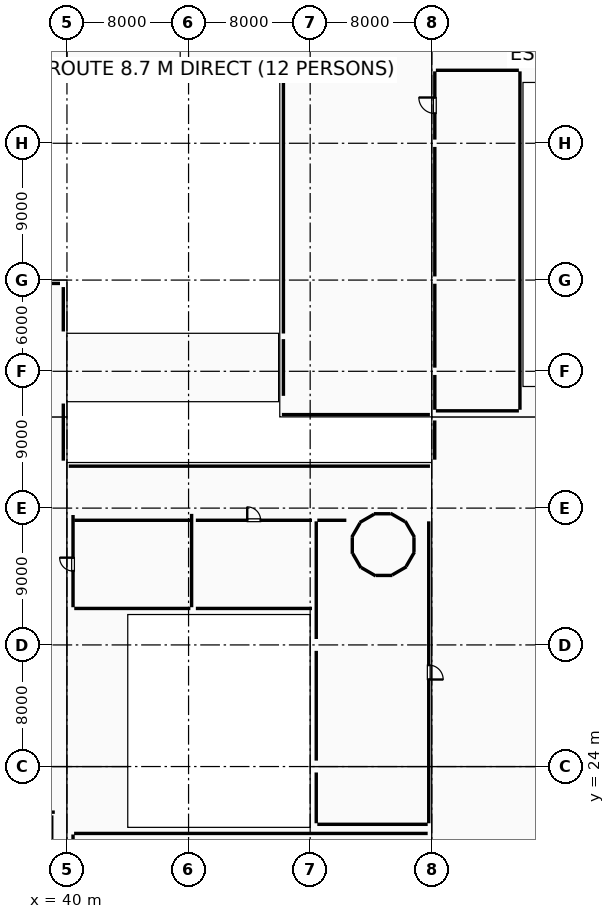
"""IFC4 building model, lengths in metres.
Left out: names, types, materials, properties, quantities, classifications, styles, units other than length and angle.
Written with IfcOpenShell. Run it as: python <this file> out.ifc"""

import sys

from ifc_helpers import new_model, si_unit, direction, frame, frame_2d, origin, origin_2d, place, context, subcontext, project, spatial, rectangle, hollow_rectangle, i_section, extrude, element, fill, save


model = new_model("IFC4")
c1 = context("Model", 3, precision=1e-05, world=origin(), true_north=direction((0.0, 1.0)))
c2 = subcontext(c1, "Body", "Model", "MODEL_VIEW")
j1 = project(units=[si_unit("LENGTHUNIT", "METRE"), si_unit("PLANEANGLEUNIT", "RADIAN")], contexts=[c1])
p1 = place(None, origin())
s1 = spatial("IfcSite", under=j1, at=p1, CompositionType="ELEMENT")
p2 = place(p1, origin())
s2 = spatial("IfcBuilding", under=s1, at=p2, CompositionType="ELEMENT")
p3 = place(p2, frame((0.0, 0.0, 10.2)))
s3 = spatial("IfcBuildingStorey", under=s2, at=p3, CompositionType="ELEMENT", Elevation=10.2)
for number, where, z_axis, x_axis in (
    (1, (40.0, 24.0, 0.0), (0.0, 0.0, 1.0), (1.0, 0.0, 0.0)),
    (2, (40.0, 32.0, 0.0), (0.0, 0.0, 1.0), (1.0, 0.0, 0.0)),
    (3, (40.0, 41.0, 0.0), (0.0, 0.0, 1.0), (1.0, 0.0, 0.0)),
    (4, (40.0, 50.0, 0.0), (0.0, 0.0, 1.0), (1.0, 0.0, 0.0)),
    (5, (40.0, 56.0, 0.0), (0.0, 0.0, 1.0), (1.0, 0.0, 0.0)),
    (6, (40.0, 65.0, 0.0), (0.0, 0.0, 1.0), (1.0, 0.0, 0.0)),
):
    element("IfcColumn", number, at=place(p3, frame(where, z_axis=z_axis, x_axis=x_axis)), inside=s3, PredefinedType="COLUMN", context=c2, shape_type="SweptSolid", body=[
        extrude(rectangle(XDim=0.9, YDim=0.9, at=origin_2d()), origin(), (0.0, 0.0, 1.0), 4.8),
    ])
p4 = place(p3, frame((48.0, 41.0, 0.0), z_axis=(0.0, 0.0, 1.0), x_axis=(1.0, 0.0, 0.0)))
e7 = element("IfcColumn", 7, at=p4, inside=s3, PredefinedType="COLUMN", context=c2, shape_type="SweptSolid", body=[
    extrude(rectangle(XDim=0.75, YDim=0.75, at=origin_2d()), origin(), (0.0, 0.0, 1.0), 4.8),
])
p5 = place(p3, frame((48.0, 65.0, 0.0), z_axis=(0.0, 0.0, 1.0), x_axis=(1.0, 0.0, 0.0)))
e8 = element("IfcColumn", 8, at=p5, inside=s3, PredefinedType="COLUMN", context=c2, shape_type="SweptSolid", body=[
    extrude(rectangle(XDim=0.65, YDim=0.65, at=origin_2d()), origin(), (0.0, 0.0, 1.0), 4.8),
])
for number, where, z_axis, x_axis in (
    (9, (56.0, 24.0, 0.0), (0.0, 0.0, 1.0), (1.0, 0.0, 0.0)),
    (10, (56.0, 32.0, 0.0), (0.0, 0.0, 1.0), (1.0, 0.0, 0.0)),
    (11, (56.0, 41.0, 0.0), (0.0, 0.0, 1.0), (1.0, 0.0, 0.0)),
):
    element("IfcColumn", number, at=place(p3, frame(where, z_axis=z_axis, x_axis=x_axis)), inside=s3, PredefinedType="COLUMN", context=c2, shape_type="SweptSolid", body=[
        extrude(rectangle(XDim=0.75, YDim=0.75, at=origin_2d()), origin(), (0.0, 0.0, 1.0), 4.8),
    ])
for number, where, z_axis, x_axis in (
    (12, (56.0, 50.0, 0.0), (0.0, 0.0, 1.0), (1.0, 0.0, 0.0)),
    (13, (56.0, 56.0, 0.0), (0.0, 0.0, 1.0), (1.0, 0.0, 0.0)),
    (14, (56.0, 65.0, 0.0), (0.0, 0.0, 1.0), (1.0, 0.0, 0.0)),
):
    element("IfcColumn", number, at=place(p3, frame(where, z_axis=z_axis, x_axis=x_axis)), inside=s3, PredefinedType="COLUMN", context=c2, shape_type="SweptSolid", body=[
        extrude(rectangle(XDim=0.9, YDim=0.9, at=origin_2d()), origin(), (0.0, 0.0, 1.0), 4.8),
    ])
p6 = place(p3, frame((64.0, 50.0, 0.0), z_axis=(0.0, 0.0, 1.0), x_axis=(1.0, 0.0, 0.0)))
e15 = element("IfcColumn", 15, at=p6, inside=s3, PredefinedType="COLUMN", context=c2, shape_type="SweptSolid", body=[
    extrude(hollow_rectangle(XDim=0.45, YDim=0.45, WallThickness=0.02, at=origin_2d()), origin(), (0.0, 0.0, 1.0), 4.8),
])
for number, where, z_axis, x_axis in (
    (16, (64.0, 56.0, 0.0), (0.0, 0.0, 1.0), (1.0, 0.0, 0.0)),
    (17, (64.0, 65.0, 0.0), (0.0, 0.0, 1.0), (1.0, 0.0, 0.0)),
):
    element("IfcColumn", number, at=place(p3, frame(where, z_axis=z_axis, x_axis=x_axis)), inside=s3, PredefinedType="COLUMN", context=c2, shape_type="SweptSolid", body=[
        extrude(i_section(OverallWidth=0.25, OverallDepth=0.45, WebThickness=0.011, FlangeThickness=0.014, FilletRadius=0.015, at=origin_2d()), origin(), (0.0, 0.0, 1.0), 4.8),
    ])
for number, where, z_axis, x_axis in (
    (18, (40.0, 48.2, 0.0), (0.0, 0.0, 1.0), (1.0, 0.0, 0.0)),
    (19, (54.0, 48.2, 0.0), (0.0, 0.0, 1.0), (1.0, 0.0, 0.0)),
    (20, (40.0, 52.3, 0.0), (0.0, 0.0, 1.0), (1.0, 0.0, 0.0)),
    (21, (54.0, 52.3, 0.0), (0.0, 0.0, 1.0), (1.0, 0.0, 0.0)),
):
    element("IfcColumn", number, at=place(p3, frame(where, z_axis=z_axis, x_axis=x_axis)), inside=s3, PredefinedType="COLUMN", context=c2, shape_type="SweptSolid", body=[
        extrude(i_section(OverallWidth=0.25, OverallDepth=0.35, WebThickness=0.01, FlangeThickness=0.012, FilletRadius=0.012, at=origin_2d()), origin(), (0.0, 0.0, 1.0), 4.8),
    ])
p7 = place(p3, frame((64.0, 47.0, 0.0), z_axis=(0.0, 0.0, 1.0), x_axis=(1.0, 0.0, 0.0)))
e22 = element("IfcColumn", 22, at=p7, inside=s3, PredefinedType="COLUMN", context=c2, shape_type="SweptSolid", body=[
    extrude(i_section(OverallWidth=0.25, OverallDepth=0.45, WebThickness=0.011, FlangeThickness=0.014, FilletRadius=0.015, at=origin_2d()), origin(), (0.0, 0.0, 1.0), 4.8),
])
p8 = place(p3, frame((70.0, 41.0, 0.0), z_axis=(0.0, 0.0, 1.0), x_axis=(1.0, 0.0, 0.0)))
e23 = element("IfcColumn", 23, at=p8, inside=s3, PredefinedType="COLUMN", context=c2, shape_type="SweptSolid", body=[
    extrude(rectangle(XDim=1.2, YDim=1.2, at=origin_2d()), origin(), (0.0, 0.0, 1.0), 4.8),
])
p9 = place(p3, frame((39.76, 47.88, 0.0), z_axis=(0.0, 0.0, 1.0), x_axis=(0.0, -1.0, 0.0)))
e24 = element("IfcWall", 24, at=p9, inside=s3, PredefinedType="PARAPET", context=c2, shape_type="SweptSolid", body=[
    extrude(rectangle(XDim=3.76, YDim=0.18, at=frame_2d((1.88, 0.0))), origin(), (0.0, 0.0, 1.0), 0.88),
])
p10 = place(p3, frame((40.12, 43.76, 0.0), z_axis=(0.0, 0.0, 1.0), x_axis=(1.0, 0.0, 0.0)))
e25 = element("IfcWall", 25, at=p10, inside=s3, PredefinedType="PARAPET", context=c2, shape_type="SweptSolid", body=[
    extrude(rectangle(XDim=23.76, YDim=0.18, at=frame_2d((11.88, 0.0))), origin(), (0.0, 0.0, 1.0), 0.88),
])
p11 = place(p3, frame((64.195, 44.185, 0.0), z_axis=(0.0, 0.0, 1.0), x_axis=(0.0, 1.0, 0.0)))
e26 = element("IfcWall", 26, at=p11, inside=s3, PredefinedType="STANDARD", context=c2, shape_type="SweptSolid", body=[
    extrude(rectangle(XDim=2.582, YDim=0.35, at=frame_2d((1.291, 0.0))), origin(), (0.0, 0.0, 1.0), 3.725),
])
p12 = place(p3, frame((63.876, 47.15, 0.0), z_axis=(0.0, 0.0, 1.0), x_axis=(-1.0, 0.0, 0.0)))
e27 = element("IfcWall", 27, at=p12, inside=s3, PredefinedType="ELEMENTEDWALL", context=c2, shape_type="SweptSolid", body=[
    extrude(rectangle(XDim=9.736, YDim=0.26, at=frame_2d((4.868, 0.0))), origin(), (0.0, 0.0, 1.0), 4.54),
])
p13 = place(p12, frame((4.076, 0.0, 0.95)))
e28 = element("IfcOpeningElement", 28, at=p13, cuts=e27, PredefinedType="OPENING", context=c2, shape_type="SweptSolid", body=[
    extrude(rectangle(XDim=1.6, YDim=2.1, at=frame_2d((0.8, 1.05))), frame((0.0, 0.14, 0.0), z_axis=(0.0, -1.0, 0.0), x_axis=(1.0, 0.0, 0.0)), (0.0, 0.0, 1.0), 0.28),
])
p14 = place(p3, frame((54.24, 48.385, 0.0), z_axis=(0.0, 0.0, 1.0), x_axis=(0.0, 1.0, 0.0)))
e29 = element("IfcWall", 29, at=p14, inside=s3, PredefinedType="PARAPET", context=c2, shape_type="SweptSolid", body=[
    extrude(rectangle(XDim=3.73, YDim=0.18, at=frame_2d((1.865, 0.0))), origin(), (0.0, 0.0, 1.0), 0.88),
])
p15 = place(p3, frame((54.24, 52.485, 0.0), z_axis=(0.0, 0.0, 1.0), x_axis=(0.0, 1.0, 0.0)))
e30 = element("IfcWall", 30, at=p15, inside=s3, PredefinedType="PARAPET", context=c2, shape_type="SweptSolid", body=[
    extrude(rectangle(XDim=17.395, YDim=0.18, at=frame_2d((8.697, 0.0))), origin(), (0.0, 0.0, 1.0), 0.88),
])
p16 = place(p3, frame((53.87, 70.14, 0.0), z_axis=(0.0, 0.0, 1.0), x_axis=(-1.0, 0.0, 0.0)))
e31 = element("IfcWall", 31, at=p16, inside=s3, PredefinedType="ELEMENTEDWALL", context=c2, shape_type="SweptSolid", body=[
    extrude(rectangle(XDim=29.74, YDim=0.24, at=frame_2d((14.87, 0.0))), origin(), (0.0, 0.0, 1.0), 4.54),
])
p17 = place(p16, frame((13.97, 0.0, 0.95)))
e32 = element("IfcOpeningElement", 32, at=p17, cuts=e31, PredefinedType="OPENING", context=c2, shape_type="SweptSolid", body=[
    extrude(rectangle(XDim=1.8, YDim=1.2, at=frame_2d((0.9, 0.6))), frame((0.0, 0.13, 0.0), z_axis=(0.0, -1.0, 0.0), x_axis=(1.0, 0.0, 0.0)), (0.0, 0.0, 1.0), 0.26),
])
p18 = place(p3, frame((32.383, 55.78, 0.0), z_axis=(0.0, 0.0, 1.0), x_axis=(1.0, 0.0, 0.0)))
e33 = element("IfcWall", 33, at=p18, inside=s3, PredefinedType="STANDARD", context=c2, shape_type="SweptSolid", body=[
    extrude(rectangle(XDim=7.159, YDim=0.4, at=frame_2d((3.58, 0.0))), origin(), (0.0, 0.0, 1.0), 3.975),
])
p19 = place(p18, frame((3.029, 0.0, 0.95)))
e34 = element("IfcOpeningElement", 34, at=p19, cuts=e33, PredefinedType="OPENING", context=c2, shape_type="SweptSolid", body=[
    extrude(rectangle(XDim=1.1, YDim=1.5, at=frame_2d((0.55, 0.75))), frame((0.0, 0.21, 0.0), z_axis=(0.0, -1.0, 0.0), x_axis=(1.0, 0.0, 0.0)), (0.0, 0.0, 1.0), 0.42),
])
p20 = place(p3, frame((39.76, 55.54, 0.0), z_axis=(0.0, 0.0, 1.0), x_axis=(0.0, -1.0, 0.0)))
e35 = element("IfcWall", 35, at=p20, inside=s3, PredefinedType="PARAPET", context=c2, shape_type="SweptSolid", body=[
    extrude(rectangle(XDim=2.92, YDim=0.18, at=frame_2d((1.46, 0.0))), origin(), (0.0, 0.0, 1.0), 0.88),
])
p21 = place(p3, frame((39.2, 21.0, 0.0), z_axis=(0.0, 0.0, 1.0), x_axis=(-1.0, 0.0, 0.0)))
e36 = element("IfcWall", 36, at=p21, inside=s3, PredefinedType="SHEAR", context=c2, shape_type="SweptSolid", body=[
    extrude(rectangle(XDim=8.946, YDim=0.4, at=frame_2d((4.473, 0.0))), origin(), (0.0, 0.0, 1.0), 4.54),
])
p22 = place(p3, frame((39.0, 12.41, 0.0), z_axis=(0.0, 0.0, 1.0), x_axis=(0.0, 1.0, 0.0)))
e37 = element("IfcWall", 37, at=p22, inside=s3, PredefinedType="SHEAR", context=c2, shape_type="SweptSolid", body=[
    extrude(rectangle(XDim=8.38, YDim=0.4, at=frame_2d((4.19, 0.0))), origin(), (0.0, 0.0, 1.0), 4.54),
])
p23 = place(p3, frame((62.861, 39.086, 0.0), z_axis=(0.0, 0.0, 1.0), x_axis=(-0.499930512259, 0.866065518833, 0.0)))
e38 = element("IfcWall", 38, at=p23, inside=s3, PredefinedType="SHEAR", context=c2, shape_type="SweptSolid", body=[
    extrude(rectangle(XDim=1.219, YDim=0.35, at=frame_2d((0.609, 0.0))), origin(), (0.0, 0.0, 1.0), 4.54),
])
for number, where, z_axis, x_axis in (
    (39, (62.233, 40.115, 0.0), (0.0, 0.0, 1.0), (-0.866, 0.5, 0.0)),
    (40, (61.283, 40.628, 0.0), (0.0, 0.0, 1.0), (-1.0, 0.0, 0.0)),
    (41, (60.205, 40.598, 0.0), (0.0, 0.0, 1.0), (-0.866, -0.5, 0.0)),
    (42, (59.285, 40.033, 0.0), (0.0, 0.0, 1.0), (-0.5, -0.866, 0.0)),
    (43, (58.771, 39.083, 0.0), (0.0, 0.0, 1.0), (0.0, -1.0, 0.0)),
    (44, (58.802, 38.004, 0.0), (0.0, 0.0, 1.0), (0.5, -0.866, 0.0)),
):
    element("IfcWall", number, at=place(p3, frame(where, z_axis=z_axis, x_axis=x_axis)), inside=s3, PredefinedType="SHEAR", context=c2, shape_type="SweptSolid", body=[
        extrude(rectangle(XDim=1.093, YDim=0.35, at=frame_2d((0.546, 0.0))), origin(), (0.0, 0.0, 1.0), 4.54),
    ])
p24 = place(p3, frame((59.367, 37.085, 0.0), z_axis=(0.0, 0.0, 1.0), x_axis=(0.866021955858, -0.500005971936, 0.0)))
e45 = element("IfcWall", 45, at=p24, inside=s3, PredefinedType="SHEAR", context=c2, shape_type="SweptSolid", body=[
    extrude(rectangle(XDim=1.093, YDim=0.35, at=frame_2d((0.547, 0.0))), origin(), (0.0, 0.0, 1.0), 4.54),
])
for number, where, z_axis, x_axis in (
    (46, (60.316, 36.572, 0.0), (0.0, 0.0, 1.0), (1.0, 0.0, 0.0)),
    (47, (61.396, 36.602, 0.0), (0.0, 0.0, 1.0), (0.866, 0.5, 0.0)),
    (48, (62.315, 37.167, 0.0), (0.0, 0.0, 1.0), (0.5, 0.866, 0.0)),
):
    element("IfcWall", number, at=place(p3, frame(where, z_axis=z_axis, x_axis=x_axis)), inside=s3, PredefinedType="SHEAR", context=c2, shape_type="SweptSolid", body=[
        extrude(rectangle(XDim=1.093, YDim=0.35, at=frame_2d((0.546, 0.0))), origin(), (0.0, 0.0, 1.0), 4.54),
    ])
p25 = place(p3, frame((62.828, 38.116, 0.0), z_axis=(0.0, 0.0, 1.0), x_axis=(0.0, 1.0, 0.0)))
e49 = element("IfcWall", 49, at=p25, inside=s3, PredefinedType="SHEAR", context=c2, shape_type="SweptSolid", body=[
    extrude(rectangle(XDim=0.967, YDim=0.35, at=frame_2d((0.483, 0.0))), origin(), (0.0, 0.0, 1.0), 4.54),
])
p26 = place(p3, frame((40.47, 19.6, 0.0), z_axis=(0.0, 0.0, 1.0), x_axis=(1.0, 0.0, 0.0)))
e50 = element("IfcWall", 50, at=p26, inside=s3, PredefinedType="PARTITIONING", context=c2, shape_type="SweptSolid", body=[
    extrude(rectangle(XDim=23.26, YDim=0.1, at=frame_2d((11.63, 0.0))), origin(), (0.0, 0.0, 1.0), 4.53),
])
p27 = place(p3, frame((40.4, 16.465, 0.0), z_axis=(0.0, 0.0, 1.0), x_axis=(0.0, 1.0, 0.0)))
e51 = element("IfcWall", 51, at=p27, inside=s3, PredefinedType="PARTITIONING", context=c2, shape_type="SweptSolid", body=[
    extrude(rectangle(XDim=3.065, YDim=0.1, at=frame_2d((1.532, 0.0))), origin(), (0.0, 0.0, 1.0), 4.53),
])
p28 = place(p3, frame((56.47, 40.2, 0.0), z_axis=(0.0, 0.0, 1.0), x_axis=(1.0, 0.0, 0.0)))
e52 = element("IfcWall", 52, at=p28, inside=s3, PredefinedType="PARTITIONING", context=c2, shape_type="SweptSolid", body=[
    extrude(rectangle(XDim=1.91, YDim=0.1, at=frame_2d((0.955, 0.0))), origin(), (0.0, 0.0, 1.0), 4.53),
])
p29 = place(p3, frame((63.8, 40.13, 0.0), z_axis=(0.0, 0.0, 1.0), x_axis=(0.0, -1.0, 0.0)))
e53 = element("IfcWall", 53, at=p29, inside=s3, PredefinedType="PARTITIONING", context=c2, shape_type="SweptSolid", body=[
    extrude(rectangle(XDim=19.86, YDim=0.1, at=frame_2d((9.93, 0.0))), origin(), (0.0, 0.0, 1.0), 3.72),
])
p30 = place(p29, frame((9.455, 0.0, 0.0)))
e54 = element("IfcOpeningElement", 54, at=p30, cuts=e53, PredefinedType="OPENING", context=c2, shape_type="SweptSolid", body=[
    extrude(rectangle(XDim=0.95, YDim=2.15, at=frame_2d((0.475, 1.075))), frame((0.0, 0.06, 0.0), z_axis=(0.0, -1.0, 0.0), x_axis=(1.0, 0.0, 0.0)), (0.0, 0.0, 1.0), 0.12),
])
p31 = place(p3, frame((63.73, 20.2, 0.0), z_axis=(0.0, 0.0, 1.0), x_axis=(-1.0, 0.0, 0.0)))
e55 = element("IfcWall", 55, at=p31, inside=s3, PredefinedType="PARTITIONING", context=c2, shape_type="SweptSolid", body=[
    extrude(rectangle(XDim=7.26, YDim=0.1, at=frame_2d((3.63, 0.0))), origin(), (0.0, 0.0, 1.0), 4.53),
])
p32 = place(p3, frame((56.4, 20.27, 0.0), z_axis=(0.0, 0.0, 1.0), x_axis=(0.0, 1.0, 0.0)))
e56 = element("IfcWall", 56, at=p32, inside=s3, PredefinedType="PARTITIONING", context=c2, shape_type="SweptSolid", body=[
    extrude(rectangle(XDim=3.34, YDim=0.1, at=frame_2d((1.67, 0.0))), origin(), (0.0, 0.0, 1.0), 4.53),
])
p33 = place(p3, frame((56.4, 24.39, 0.0), z_axis=(0.0, 0.0, 1.0), x_axis=(0.0, 1.0, 0.0)))
e57 = element("IfcWall", 57, at=p33, inside=s3, PredefinedType="PARTITIONING", context=c2, shape_type="SweptSolid", body=[
    extrude(rectangle(XDim=7.22, YDim=0.1, at=frame_2d((3.61, 0.0))), origin(), (0.0, 0.0, 1.0), 4.53),
])
p34 = place(p3, frame((56.4, 32.39, 0.0), z_axis=(0.0, 0.0, 1.0), x_axis=(0.0, 1.0, 0.0)))
e58 = element("IfcWall", 58, at=p34, inside=s3, PredefinedType="PARTITIONING", context=c2, shape_type="SweptSolid", body=[
    extrude(rectangle(XDim=7.74, YDim=0.1, at=frame_2d((3.87, 0.0))), origin(), (0.0, 0.0, 1.0), 4.53),
])
p35 = place(p3, frame((64.27, 69.8, 0.0), z_axis=(0.0, 0.0, 1.0), x_axis=(1.0, 0.0, 0.0)))
e59 = element("IfcWall", 59, at=p35, inside=s3, PredefinedType="PARTITIONING", context=c2, shape_type="SweptSolid", body=[
    extrude(rectangle(XDim=5.46, YDim=0.1, at=frame_2d((2.73, 0.0))), origin(), (0.0, 0.0, 1.0), 4.53),
])
p36 = place(p3, frame((69.8, 69.73, 0.0), z_axis=(0.0, 0.0, 1.0), x_axis=(0.0, -1.0, 0.0)))
e60 = element("IfcWall", 60, at=p36, inside=s3, PredefinedType="PARTITIONING", context=c2, shape_type="SweptSolid", body=[
    extrude(rectangle(XDim=22.26, YDim=0.1, at=frame_2d((11.13, 0.0))), origin(), (0.0, 0.0, 1.0), 4.53),
])
p37 = place(p3, frame((69.73, 47.4, 0.0), z_axis=(0.0, 0.0, 1.0), x_axis=(-1.0, 0.0, 0.0)))
e61 = element("IfcWall", 61, at=p37, inside=s3, PredefinedType="PARTITIONING", context=c2, shape_type="SweptSolid", body=[
    extrude(rectangle(XDim=5.46, YDim=0.1, at=frame_2d((2.73, 0.0))), origin(), (0.0, 0.0, 1.0), 3.72),
])
p38 = place(p3, frame((64.2, 47.47, 0.0), z_axis=(0.0, 0.0, 1.0), x_axis=(0.0, 1.0, 0.0)))
e62 = element("IfcWall", 62, at=p38, inside=s3, PredefinedType="PARTITIONING", context=c2, shape_type="SweptSolid", body=[
    extrude(rectangle(XDim=2.29, YDim=0.1, at=frame_2d((1.145, 0.0))), origin(), (0.0, 0.0, 1.0), 4.22),
])
p39 = place(p3, frame((64.2, 50.24, 0.0), z_axis=(0.0, 0.0, 1.0), x_axis=(0.0, 1.0, 0.0)))
e63 = element("IfcWall", 63, at=p39, inside=s3, PredefinedType="PARTITIONING", context=c2, shape_type="SweptSolid", body=[
    extrude(rectangle(XDim=5.52, YDim=0.1, at=frame_2d((2.76, 0.0))), origin(), (0.0, 0.0, 1.0), 3.92),
])
p40 = place(p3, frame((64.2, 56.24, 0.0), z_axis=(0.0, 0.0, 1.0), x_axis=(0.0, 1.0, 0.0)))
e64 = element("IfcWall", 64, at=p40, inside=s3, PredefinedType="PARTITIONING", context=c2, shape_type="SweptSolid", body=[
    extrude(rectangle(XDim=8.52, YDim=0.1, at=frame_2d((4.26, 0.0))), origin(), (0.0, 0.0, 1.0), 3.97),
])
p41 = place(p3, frame((64.2, 65.24, 0.0), z_axis=(0.0, 0.0, 1.0), x_axis=(0.0, 1.0, 0.0)))
e65 = element("IfcWall", 65, at=p41, inside=s3, PredefinedType="PARTITIONING", context=c2, shape_type="SweptSolid", body=[
    extrude(rectangle(XDim=4.49, YDim=0.1, at=frame_2d((2.245, 0.0))), origin(), (0.0, 0.0, 1.0), 4.02),
])
p42 = place(p41, frame((1.72, 0.0, 0.0)))
e66 = element("IfcOpeningElement", 66, at=p42, cuts=e65, PredefinedType="OPENING", context=c2, shape_type="SweptSolid", body=[
    extrude(rectangle(XDim=1.05, YDim=2.15, at=frame_2d((0.525, 1.075))), frame((0.0, 0.06, 0.0), z_axis=(0.0, -1.0, 0.0), x_axis=(1.0, 0.0, 0.0)), (0.0, 0.0, 1.0), 0.12),
])
p43 = place(p3, frame((40.48, 40.2, 0.0), z_axis=(0.0, 0.0, 1.0), x_axis=(1.0, 0.0, 0.0)))
e67 = element("IfcWall", 67, at=p43, inside=s3, PredefinedType="PARTITIONING", context=c2, shape_type="SweptSolid", body=[
    extrude(rectangle(XDim=7.64, YDim=0.12, at=frame_2d((3.82, 0.0))), origin(), (0.0, 0.0, 1.0), 4.53),
])
p44 = place(p3, frame((48.2, 40.621, 0.0), z_axis=(0.0, 0.0, 1.0), x_axis=(0.0, -1.0, 0.0)))
e68 = element("IfcWall", 68, at=p44, inside=s3, PredefinedType="PARTITIONING", context=c2, shape_type="SweptSolid", body=[
    extrude(rectangle(XDim=6.141, YDim=0.12, at=frame_2d((3.071, 0.0))), origin(), (0.0, 0.0, 1.0), 4.53),
])
p45 = place(p3, frame((48.12, 34.4, 0.0), z_axis=(0.0, 0.0, 1.0), x_axis=(-1.0, 0.0, 0.0)))
e69 = element("IfcWall", 69, at=p45, inside=s3, PredefinedType="PARTITIONING", context=c2, shape_type="SweptSolid", body=[
    extrude(rectangle(XDim=7.64, YDim=0.12, at=frame_2d((3.82, 0.0))), origin(), (0.0, 0.0, 1.0), 4.53),
])
p46 = place(p3, frame((40.4, 34.48, 0.0), z_axis=(0.0, 0.0, 1.0), x_axis=(0.0, 1.0, 0.0)))
e70 = element("IfcWall", 70, at=p46, inside=s3, PredefinedType="PARTITIONING", context=c2, shape_type="SweptSolid", body=[
    extrude(rectangle(XDim=6.066, YDim=0.12, at=frame_2d((3.033, 0.0))), origin(), (0.0, 0.0, 1.0), 4.53),
])
p47 = place(p46, frame((2.38, 0.0, 0.0)))
e71 = element("IfcOpeningElement", 71, at=p47, cuts=e70, PredefinedType="OPENING", context=c2, shape_type="SweptSolid", body=[
    extrude(rectangle(XDim=0.88, YDim=2.1, at=frame_2d((0.44, 1.05))), frame((0.0, 0.07, 0.0), z_axis=(0.0, -1.0, 0.0), x_axis=(1.0, 0.0, 0.0)), (0.0, 0.0, 1.0), 0.14),
])
p48 = place(p3, frame((48.48, 40.2, 0.0), z_axis=(0.0, 0.0, 1.0), x_axis=(1.0, 0.0, 0.0)))
e72 = element("IfcWall", 72, at=p48, inside=s3, PredefinedType="PARTITIONING", context=c2, shape_type="SweptSolid", body=[
    extrude(rectangle(XDim=7.64, YDim=0.12, at=frame_2d((3.82, 0.0))), origin(), (0.0, 0.0, 1.0), 4.53),
])
p49 = place(p48, frame((3.38, 0.0, 0.0)))
e73 = element("IfcOpeningElement", 73, at=p49, cuts=e72, PredefinedType="OPENING", context=c2, shape_type="SweptSolid", body=[
    extrude(rectangle(XDim=0.88, YDim=2.1, at=frame_2d((0.44, 1.05))), frame((0.0, 0.07, 0.0), z_axis=(0.0, -1.0, 0.0), x_axis=(1.0, 0.0, 0.0)), (0.0, 0.0, 1.0), 0.14),
])
p50 = place(p3, frame((56.12, 34.4, 0.0), z_axis=(0.0, 0.0, 1.0), x_axis=(-1.0, 0.0, 0.0)))
e74 = element("IfcWall", 74, at=p50, inside=s3, PredefinedType="PARTITIONING", context=c2, shape_type="SweptSolid", body=[
    extrude(rectangle(XDim=7.64, YDim=0.12, at=frame_2d((3.82, 0.0))), origin(), (0.0, 0.0, 1.0), 4.53),
])
p51 = place(p13, origin())
e75 = element("IfcWindow", 75, at=p51, inside=s3, PartitioningType="SINGLE_PANEL", PredefinedType="WINDOW", context=c2, shape_type="SweptSolid", body=[
    extrude(rectangle(XDim=1.6, YDim=2.1, at=frame_2d((0.8, 1.05))), frame((0.0, 0.03, 0.0), z_axis=(0.0, -1.0, 0.0), x_axis=(1.0, 0.0, 0.0)), (0.0, 0.0, 1.0), 0.06),
])
fill(e28, e75)
p52 = place(p17, origin())
e76 = element("IfcWindow", 76, at=p52, inside=s3, PartitioningType="SINGLE_PANEL", PredefinedType="WINDOW", context=c2, shape_type="SweptSolid", body=[
    extrude(rectangle(XDim=1.8, YDim=1.2, at=frame_2d((0.9, 0.6))), frame((0.0, 0.03, 0.0), z_axis=(0.0, -1.0, 0.0), x_axis=(1.0, 0.0, 0.0)), (0.0, 0.0, 1.0), 0.06),
])
fill(e32, e76)
p53 = place(p30, origin())
e77 = element("IfcDoor", 77, at=p53, inside=s3, OperationType="SINGLE_SWING_RIGHT", PredefinedType="DOOR", context=c2, shape_type="SweptSolid", body=[
    extrude(rectangle(XDim=0.95, YDim=2.15, at=frame_2d((0.475, 1.075))), frame((0.0, 0.025, 0.0), z_axis=(0.0, -1.0, 0.0), x_axis=(1.0, 0.0, 0.0)), (0.0, 0.0, 1.0), 0.05),
])
fill(e54, e77)
p54 = place(p42, origin())
e78 = element("IfcDoor", 78, at=p54, inside=s3, OperationType="SINGLE_SWING_RIGHT", PredefinedType="DOOR", context=c2, shape_type="SweptSolid", body=[
    extrude(rectangle(XDim=1.05, YDim=2.15, at=frame_2d((0.525, 1.075))), frame((0.0, 0.025, 0.0), z_axis=(0.0, -1.0, 0.0), x_axis=(1.0, 0.0, 0.0)), (0.0, 0.0, 1.0), 0.05),
])
fill(e66, e78)
p55 = place(p47, origin())
e79 = element("IfcDoor", 79, at=p55, inside=s3, OperationType="SINGLE_SWING_RIGHT", PredefinedType="DOOR", context=c2, shape_type="SweptSolid", body=[
    extrude(rectangle(XDim=0.88, YDim=2.1, at=frame_2d((0.44, 1.05))), frame((0.0, 0.025, 0.0), z_axis=(0.0, -1.0, 0.0), x_axis=(1.0, 0.0, 0.0)), (0.0, 0.0, 1.0), 0.05),
])
fill(e71, e79)
p56 = place(p49, origin())
e80 = element("IfcDoor", 80, at=p56, inside=s3, OperationType="SINGLE_SWING_LEFT", PredefinedType="DOOR", context=c2, shape_type="SweptSolid", body=[
    extrude(rectangle(XDim=0.88, YDim=2.1, at=frame_2d((0.44, 1.05))), frame((0.0, 0.025, 0.0), z_axis=(0.0, -1.0, 0.0), x_axis=(1.0, 0.0, 0.0)), (0.0, 0.0, 1.0), 0.05),
])
fill(e73, e80)
save(model, sys.argv[1])
